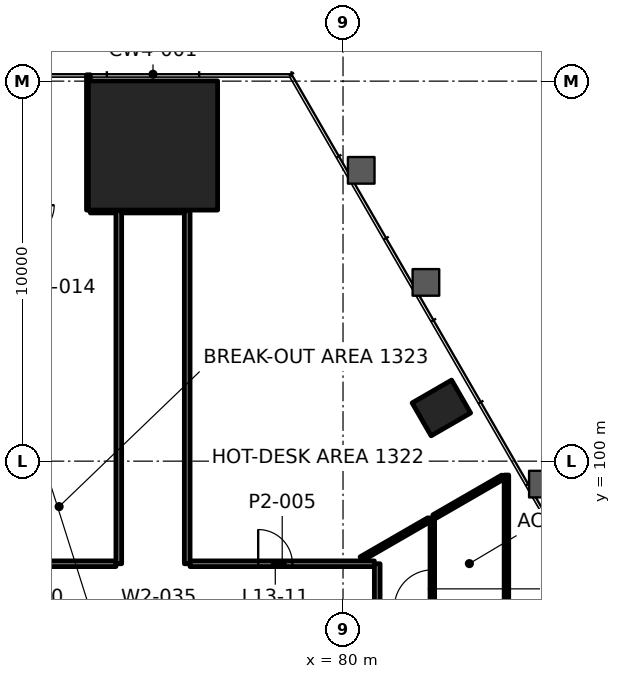
"""IFC4 building model, lengths in metres.
Left out: names, types, materials, properties, quantities, classifications, styles, units other than length and angle.
Written with IfcOpenShell. Run it as: python <this file> out.ifc"""

import sys

from ifc_helpers import new_model, si_unit, direction, frame, frame_2d, origin, origin_2d, place, context, subcontext, project, spatial, rectangle, extrude, element, fill, save


model = new_model("IFC4")
c1 = context("Model", 3, precision=1e-05, world=origin(), true_north=direction((0.0, 1.0)))
c2 = subcontext(c1, "Body", "Model", "MODEL_VIEW")
j1 = project(units=[si_unit("LENGTHUNIT", "METRE"), si_unit("PLANEANGLEUNIT", "RADIAN")], contexts=[c1])
p1 = place(None, origin())
s1 = spatial("IfcSite", under=j1, at=p1, CompositionType="ELEMENT")
p2 = place(p1, origin())
s2 = spatial("IfcBuilding", under=s1, at=p2, CompositionType="ELEMENT")
p3 = place(p2, frame((0.0, 0.0, 61.0)))
s3 = spatial("IfcBuildingStorey", under=s2, at=p3, CompositionType="ELEMENT", Elevation=61.0)
p4 = place(p3, frame((75.0, 108.307, 0.0), z_axis=(0.0, 0.0, 1.0), x_axis=(-1.0, 0.0, 0.0)))
e1 = element("IfcColumn", 1, at=p4, inside=s3, PredefinedType="COLUMN", context=c2, shape_type="SweptSolid", body=[
    extrude(rectangle(XDim=3.4, YDim=3.4, at=origin_2d()), origin(), (0.0, 0.0, 1.0), 4.2),
])
p5 = place(p3, frame((82.588, 101.4, -0.0), z_axis=(0.0, 0.0, 1.0), x_axis=(-0.5, 0.866025403784, 0.0)))
e2 = element("IfcColumn", 2, at=p5, inside=s3, PredefinedType="COLUMN", context=c2, shape_type="SweptSolid", body=[
    extrude(rectangle(XDim=1.0, YDim=1.2, at=origin_2d()), origin(), (0.0, 0.0, 1.0), 4.2),
])
p6 = place(p3, frame((69.175, 97.3, 0.0), z_axis=(0.0, 0.0, 1.0), x_axis=(1.0, 0.0, 0.0)))
e3 = element("IfcWall", 3, at=p6, inside=s3, PredefinedType="PARTITIONING", context=c2, shape_type="SweptSolid", body=[
    extrude(rectangle(XDim=4.85, YDim=0.15, at=frame_2d((2.425, 0.0))), origin(), (0.0, 0.0, 1.0), 3.4),
])
p7 = place(p6, frame((2.107, 0.0, 0.0)))
e4 = element("IfcOpeningElement", 4, at=p7, cuts=e3, PredefinedType="OPENING", context=c2, shape_type="SweptSolid", body=[
    extrude(rectangle(XDim=1.0, YDim=2.1, at=frame_2d((0.5, 1.05))), frame((0.0, 0.085, 0.0), z_axis=(0.0, -1.0, 0.0), x_axis=(1.0, 0.0, 0.0)), (0.0, 0.0, 1.0), 0.17),
])
p8 = place(p3, frame((75.975, 97.3, 0.0), z_axis=(0.0, 0.0, 1.0), x_axis=(1.0, 0.0, 0.0)))
e5 = element("IfcWall", 5, at=p8, inside=s3, PredefinedType="PARTITIONING", context=c2, shape_type="SweptSolid", body=[
    extrude(rectangle(XDim=4.85, YDim=0.15, at=frame_2d((2.425, 0.0))), origin(), (0.0, 0.0, 1.0), 3.4),
])
p9 = place(p8, frame((1.792, 0.0, 0.0)))
e6 = element("IfcOpeningElement", 6, at=p9, cuts=e5, PredefinedType="OPENING", context=c2, shape_type="SweptSolid", body=[
    extrude(rectangle(XDim=0.9, YDim=2.1, at=frame_2d((0.45, 1.05))), frame((0.0, 0.085, 0.0), z_axis=(0.0, -1.0, 0.0), x_axis=(1.0, 0.0, 0.0)), (0.0, 0.0, 1.0), 0.17),
])
p10 = place(p3, frame((73.351, 106.607, 0.0), z_axis=(0.0, 0.0, 1.0), x_axis=(1.0, 0.0, 0.0)))
e7 = element("IfcWall", 7, at=p10, inside=s3, PredefinedType="PARTITIONING", context=c2, shape_type="SweptSolid", body=[
    extrude(rectangle(XDim=0.674, YDim=0.15, at=frame_2d((0.337, 0.0))), origin(), (0.0, 0.0, 1.0), 3.4),
])
p11 = place(p3, frame((80.479, 97.43, 0.0), z_axis=(0.0, 0.0, 1.0), x_axis=(0.866057052383, 0.499945179012, 0.0)))
e8 = element("IfcWall", 8, at=p11, inside=s3, PredefinedType="PARTITIONING", context=c2, shape_type="SweptSolid", body=[
    extrude(rectangle(XDim=2.056, YDim=0.12, at=frame_2d((1.028, 0.0))), origin(), (0.0, 0.0, 1.0), 3.4),
])
p12 = place(p3, frame((84.3, 91.379, 0.0), z_axis=(0.0, 0.0, 1.0), x_axis=(0.0, 1.0, 0.0)))
e9 = element("IfcWall", 9, at=p12, inside=s3, PredefinedType="PARTITIONING", context=c2, shape_type="SweptSolid", body=[
    extrude(rectangle(XDim=8.255, YDim=0.12, at=frame_2d((4.127, 0.0))), origin(), (0.0, 0.0, 1.0), 3.165),
])
p13 = place(p3, frame((82.35, 90.253, 0.0), z_axis=(0.0, 0.0, 1.0), x_axis=(0.0, 1.0, 0.0)))
e10 = element("IfcWall", 10, at=p13, inside=s3, PredefinedType="PARTITIONING", context=c2, shape_type="SweptSolid", body=[
    extrude(rectangle(XDim=8.257, YDim=0.12, at=frame_2d((4.128, 0.0))), origin(), (0.0, 0.0, 1.0), 3.4),
])
p14 = place(p13, frame((0.831, 0.0, 0.0)))
e11 = element("IfcOpeningElement", 11, at=p14, cuts=e10, PredefinedType="OPENING", context=c2, shape_type="SweptSolid", body=[
    extrude(rectangle(XDim=0.9, YDim=2.1, at=frame_2d((0.45, 1.05))), frame((0.0, 0.07, 0.0), z_axis=(0.0, -1.0, 0.0), x_axis=(1.0, 0.0, 0.0)), (0.0, 0.0, 1.0), 0.14),
])
p15 = place(p13, frame((3.089, 0.0, 0.0)))
e12 = element("IfcOpeningElement", 12, at=p15, cuts=e10, PredefinedType="OPENING", context=c2, shape_type="SweptSolid", body=[
    extrude(rectangle(XDim=0.9, YDim=2.1, at=frame_2d((0.45, 1.05))), frame((0.0, 0.07, 0.0), z_axis=(0.0, -1.0, 0.0), x_axis=(1.0, 0.0, 0.0)), (0.0, 0.0, 1.0), 0.14),
])
p16 = place(p13, frame((5.886, 0.0, 0.0)))
e13 = element("IfcOpeningElement", 13, at=p16, cuts=e10, PredefinedType="OPENING", context=c2, shape_type="SweptSolid", body=[
    extrude(rectangle(XDim=1.0, YDim=2.1, at=frame_2d((0.5, 1.05))), frame((0.0, 0.07, 0.0), z_axis=(0.0, -1.0, 0.0), x_axis=(1.0, 0.0, 0.0)), (0.0, 0.0, 1.0), 0.14),
])
p17 = place(p3, frame((80.9, 97.3, 0.0), z_axis=(0.0, 0.0, 1.0), x_axis=(0.0, -1.0, 0.0)))
e14 = element("IfcWall", 14, at=p17, inside=s3, PredefinedType="PARTITIONING", context=c2, shape_type="SweptSolid", body=[
    extrude(rectangle(XDim=10.6, YDim=0.15, at=frame_2d((5.3, 0.0))), origin(), (0.0, 0.0, 1.0), 3.4),
])
p18 = place(p17, frame((3.444, 0.0, 0.0)))
e15 = element("IfcOpeningElement", 15, at=p18, cuts=e14, PredefinedType="OPENING", context=c2, shape_type="SweptSolid", body=[
    extrude(rectangle(XDim=1.2, YDim=2.1, at=frame_2d((0.6, 1.05))), frame((0.0, 0.085, 0.0), z_axis=(0.0, -1.0, 0.0), x_axis=(1.0, 0.0, 0.0)), (0.0, 0.0, 1.0), 0.17),
])
p19 = place(p3, frame((75.9, 97.3, 0.0), z_axis=(0.0, 0.0, 1.0), x_axis=(0.0, 1.0, 0.0)))
e16 = element("IfcWall", 16, at=p19, inside=s3, PredefinedType="PARTITIONING", context=c2, shape_type="SweptSolid", body=[
    extrude(rectangle(XDim=9.306, YDim=0.15, at=frame_2d((4.653, 0.0))), origin(), (0.0, 0.0, 1.0), 3.4),
])
p20 = place(p3, frame((74.1, 97.3, 0.0), z_axis=(0.0, 0.0, 1.0), x_axis=(0.0, 1.0, 0.0)))
e17 = element("IfcWall", 17, at=p20, inside=s3, PredefinedType="PARTITIONING", context=c2, shape_type="SweptSolid", body=[
    extrude(rectangle(XDim=9.307, YDim=0.15, at=frame_2d((4.653, 0.0))), origin(), (0.0, 0.0, 1.0), 3.4),
])
p21 = place(p3, frame((73.3, 106.607, 0.0), z_axis=(0.0, 0.0, 1.0), x_axis=(0.0, 1.0, 0.0)))
e18 = element("IfcWall", 18, at=p21, inside=s3, PredefinedType="PARTITIONING", context=c2, shape_type="SweptSolid", body=[
    extrude(rectangle(XDim=3.56, YDim=0.1, at=frame_2d((1.78, 0.0))), origin(), (0.0, 0.0, 1.0), 3.4),
])
p22 = place(p3, frame((74.175, 106.607, 0.0), z_axis=(0.0, 0.0, 1.0), x_axis=(1.0, 0.0, 0.0)))
e19 = element("IfcWall", 19, at=p22, inside=s3, PredefinedType="PARTITIONING", context=c2, shape_type="SweptSolid", body=[
    extrude(rectangle(XDim=1.649, YDim=0.15, at=frame_2d((0.825, 0.0))), origin(), (0.0, 0.0, 1.0), 3.397),
])
p23 = place(p3, frame((82.395, 98.536, 0.0), z_axis=(0.0, 0.0, 1.0), x_axis=(0.866041603473, 0.499971940267, 0.0)))
e20 = element("IfcWall", 20, at=p23, inside=s3, PredefinedType="PARTITIONING", context=c2, shape_type="SweptSolid", body=[
    extrude(rectangle(XDim=2.089, YDim=0.12, at=frame_2d((1.045, 0.0))), origin(), (0.0, 0.0, 1.0), 3.165),
])
p24 = place(p9, origin())
e21 = element("IfcDoor", 21, at=p24, inside=s3, OperationType="SINGLE_SWING_LEFT", PredefinedType="DOOR", context=c2, shape_type="SweptSolid", body=[
    extrude(rectangle(XDim=0.9, YDim=2.1, at=frame_2d((0.45, 1.05))), frame((0.0, 0.025, 0.0), z_axis=(0.0, -1.0, 0.0), x_axis=(1.0, 0.0, 0.0)), (0.0, 0.0, 1.0), 0.05),
])
fill(e6, e21)
p25 = place(p16, origin())
e22 = element("IfcDoor", 22, at=p25, inside=s3, OperationType="SINGLE_SWING_RIGHT", PredefinedType="DOOR", context=c2, shape_type="SweptSolid", body=[
    extrude(rectangle(XDim=1.0, YDim=2.1, at=frame_2d((0.5, 1.05))), frame((0.0, 0.025, 0.0), z_axis=(0.0, -1.0, 0.0), x_axis=(1.0, 0.0, 0.0)), (0.0, 0.0, 1.0), 0.05),
])
fill(e13, e22)
save(model, sys.argv[1])
